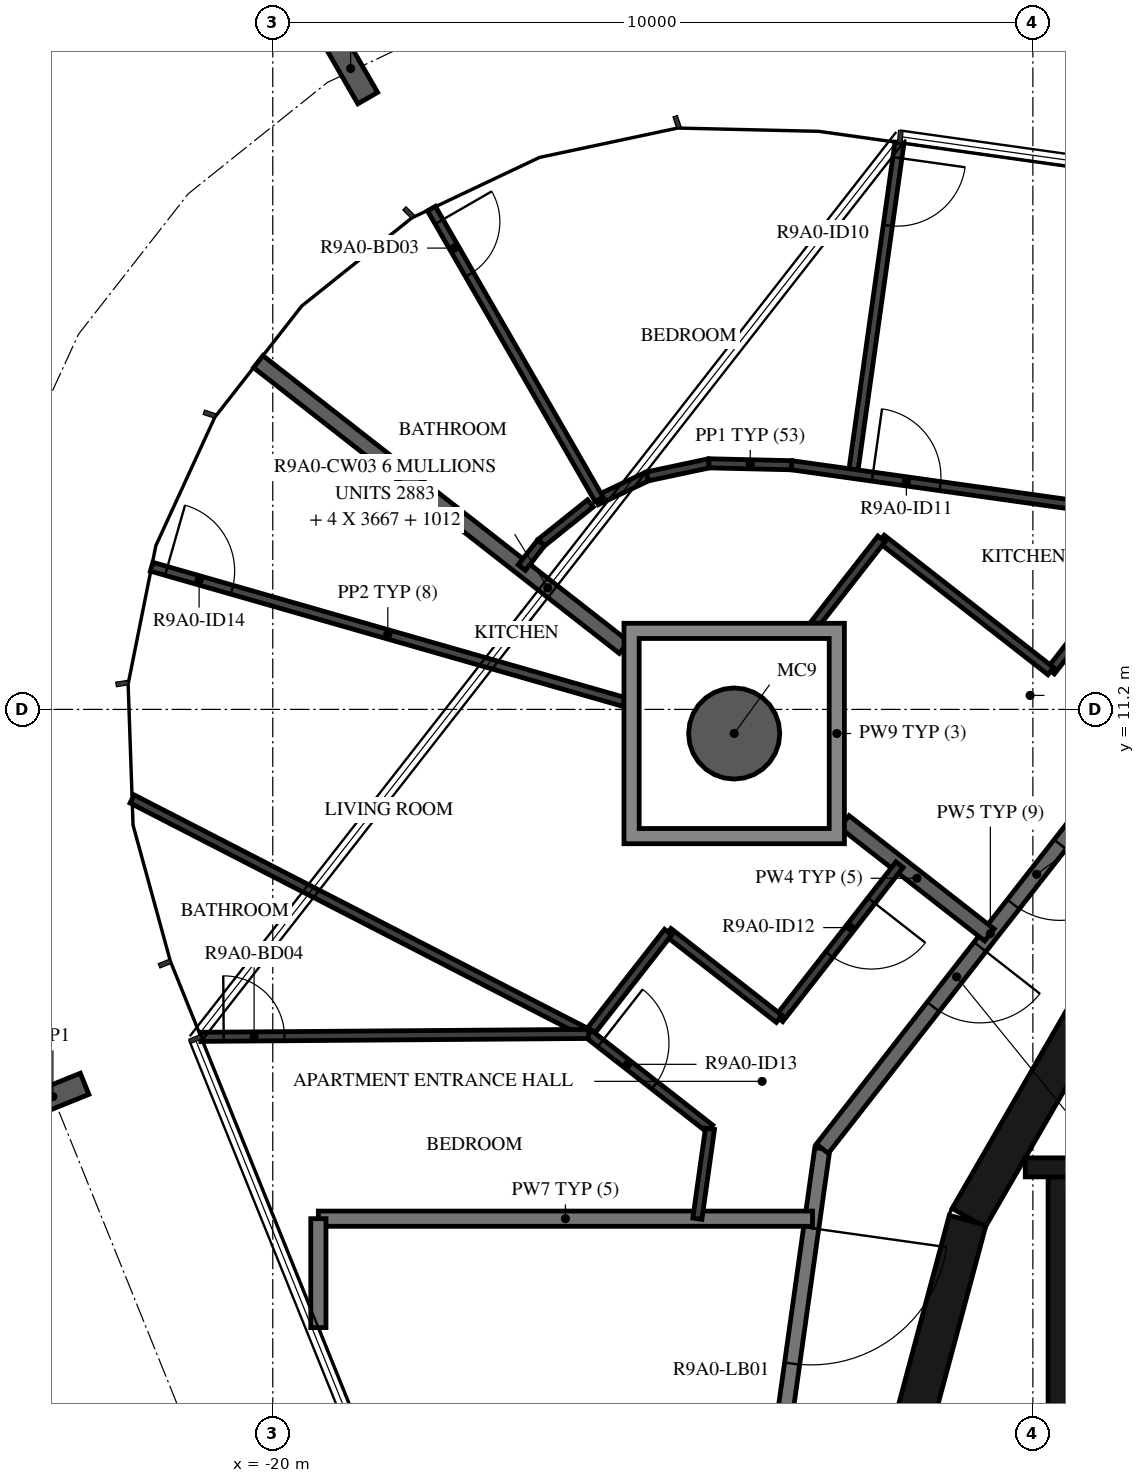
"""IFC4 building model, lengths in metres.
Left out: names, types, materials, properties, quantities, classifications, styles, units other than length and angle.
Written with IfcOpenShell. Run it as: python <this file> out.ifc"""

import sys

from ifc_helpers import new_model, si_unit, direction, frame, frame_2d, origin, origin_2d, place, context, subcontext, project, spatial, polyline, rectangle, hollow_circle, i_section, outline, extrude, element, fill, save


model = new_model("IFC4")
c1 = context("Model", 3, precision=1e-05, world=origin(), true_north=direction((0.0, 1.0)))
c2 = subcontext(c1, "Body", "Model", "MODEL_VIEW")
j1 = project(units=[si_unit("LENGTHUNIT", "METRE"), si_unit("PLANEANGLEUNIT", "RADIAN")], contexts=[c1])
p1 = place(None, origin())
s1 = spatial("IfcSite", under=j1, at=p1, CompositionType="ELEMENT")
p2 = place(p1, origin())
s2 = spatial("IfcBuilding", under=s1, at=p2, CompositionType="ELEMENT")
p3 = place(p2, frame((0.0, 0.0, 340.0)))
s3 = spatial("IfcBuildingStorey", under=s2, at=p3, CompositionType="ELEMENT", Elevation=340.0)
p4 = place(p3, frame((-13.929, 10.883, -0.38), z_axis=(0.0, 0.0, 1.0), x_axis=(1.0, 0.0, 0.0)))
e1 = element("IfcColumn", 1, at=p4, inside=s3, PredefinedType="COLUMN", context=c2, shape_type="SweptSolid", body=[
    extrude(hollow_circle(Radius=0.6, WallThickness=0.03, at=origin_2d()), origin(), (0.0, 0.0, 1.0), 3.5),
])
for number, where, z_axis, x_axis in (
    (2, (-18.976, 19.632, -0.38), (0.0, 0.0, 1.0), (0.866, 0.5, 0.0)),
    (3, (-22.893, 6.106, -0.38), (0.0, 0.0, 1.0), (-0.375, 0.927, 0.0)),
):
    element("IfcColumn", number, at=place(p3, frame(where, z_axis=z_axis, x_axis=x_axis)), inside=s3, PredefinedType="COLUMN", context=c2, shape_type="SweptSolid", body=[
        extrude(i_section(OverallWidth=0.3, OverallDepth=0.9, WebThickness=0.019, FlangeThickness=0.035, FilletRadius=0.03, at=origin_2d()), origin(), (0.0, 0.0, 1.0), 3.5),
    ])
for number, where, z_axis, x_axis in (
    (4, (-9.329, 7.137, 0.0), (0.0, 0.0, 1.0), (-0.5, -0.866, 0.0)),
    (5, (-10.858, 4.479, 0.0), (0.0, 0.0, 1.0), (-0.259, -0.966, 0.0)),
):
    element("IfcWall", number, at=place(p3, frame(where, z_axis=z_axis, x_axis=x_axis)), inside=s3, PredefinedType="SHEAR", context=c2, shape_type="SweptSolid", body=[
        extrude(rectangle(XDim=3.033, YDim=0.5, at=frame_2d((1.516, 0.0))), origin(), (0.0, 0.0, 1.0), 3.12),
    ])
p5 = place(p3, frame((-7.0, 5.175, 0.0), z_axis=(0.0, 0.0, 1.0), x_axis=(-1.0, 0.0, 0.0)))
e6 = element("IfcWall", 6, at=p5, inside=s3, PredefinedType="SHEAR", context=c2, shape_type="SweptSolid", body=[
    extrude(rectangle(XDim=3.1, YDim=0.25, at=frame_2d((1.55, 0.0))), origin(), (0.0, 0.0, 1.0), 3.12),
])
p6 = place(p3, origin())
e7 = element("IfcWall", 7, at=p6, inside=s3, PredefinedType="SHEAR", context=c2, shape_type="SweptSolid", body=[
    extrude(outline(polyline([(-9.8, 1.9), (-9.55, 1.9), (-9.55, 4.8), (-3.35, 4.8), (-3.35, 1.9), (-3.1, 1.9), (-3.1, 4.8), (3.1, 4.8), (3.1, 1.9), (3.35, 1.9), (3.35, 4.8), (5.25, 4.8), (5.25, 1.9), (5.5, 1.9), (5.5, 4.8), (7.4, 4.8), (7.4, 1.9), (7.65, 1.9), (7.65, 4.8), (9.55, 4.8), (9.55, 1.9), (9.8, 1.9), (9.8, 4.8), (9.8, 5.05), (-9.8, 5.05), (-9.8, 4.8), (-9.8, 1.9)])), origin(), (0.0, 0.0, 1.0), 3.12),
])
p7 = place(p3, frame((-12.77, 5.42, 0.0), z_axis=(0.0, 0.0, 1.0), x_axis=(-0.139155334385, -0.990270565508, 0.0)))
e8 = element("IfcWall", 8, at=p7, inside=s3, PredefinedType="STANDARD", context=c2, shape_type="SweptSolid", body=[
    extrude(rectangle(XDim=7.181, YDim=0.2, at=frame_2d((3.59, 0.0))), origin(), (0.0, 0.0, 1.0), 3.12),
])
p8 = place(p7, frame((1.055, 0.0, 0.0)))
e9 = element("IfcOpeningElement", 9, at=p8, cuts=e8, PredefinedType="OPENING", context=c2, shape_type="SweptSolid", body=[
    extrude(rectangle(XDim=1.8, YDim=2.1, at=frame_2d((0.9, 1.05))), frame((0.0, 0.11, 0.0), z_axis=(0.0, -1.0, 0.0), x_axis=(1.0, 0.0, 0.0)), (0.0, 0.0, 1.0), 0.22),
])
p9 = place(p3, frame((-8.349, 11.079, 0.0), z_axis=(0.0, 0.0, 1.0), x_axis=(-0.615669112324, -0.78800478687, 0.0)))
e10 = element("IfcWall", 10, at=p9, inside=s3, PredefinedType="STANDARD", context=c2, shape_type="SweptSolid", body=[
    extrude(rectangle(XDim=7.181, YDim=0.2, at=frame_2d((3.591, 0.0))), origin(), (0.0, 0.0, 1.0), 3.12),
])
p10 = place(p9, frame((2.1, 0.0, 0.0)))
e11 = element("IfcOpeningElement", 11, at=p10, cuts=e10, PredefinedType="OPENING", context=c2, shape_type="SweptSolid", body=[
    extrude(rectangle(XDim=1.0, YDim=2.1, at=frame_2d((0.5, 1.05))), frame((0.0, 0.11, 0.0), z_axis=(0.0, -1.0, 0.0), x_axis=(1.0, 0.0, 0.0)), (0.0, 0.0, 1.0), 0.22),
])
p11 = place(p9, frame((3.811, 0.0, 0.0)))
e12 = element("IfcOpeningElement", 12, at=p11, cuts=e10, PredefinedType="OPENING", context=c2, shape_type="SweptSolid", body=[
    extrude(rectangle(XDim=1.0, YDim=2.1, at=frame_2d((0.5, 1.05))), frame((0.0, 0.11, 0.0), z_axis=(0.0, -1.0, 0.0), x_axis=(1.0, 0.0, 0.0)), (0.0, 0.0, 1.0), 0.22),
])
p12 = place(p3, frame((-12.899, 4.5, 0.0), z_axis=(0.0, 0.0, 1.0), x_axis=(-1.0, 0.0, 0.0)))
e13 = element("IfcWall", 13, at=p12, inside=s3, PredefinedType="STANDARD", context=c2, shape_type="SweptSolid", body=[
    extrude(rectangle(XDim=6.5, YDim=0.2, at=frame_2d((3.25, 0.0))), origin(), (0.0, 0.0, 1.0), 3.12),
])
p13 = place(p3, frame((-19.4, 4.5, 0.0), z_axis=(0.0, 0.0, 1.0), x_axis=(0.0, -1.0, 0.0)))
e14 = element("IfcWall", 14, at=p13, inside=s3, PredefinedType="STANDARD", context=c2, shape_type="SweptSolid", body=[
    extrude(rectangle(XDim=1.433, YDim=0.2, at=frame_2d((0.716, 0.0))), origin(), (0.0, 0.0, 1.0), 3.12),
])
p14 = place(p3, frame((-12.479, 9.723, 0.0), z_axis=(0.0, 0.0, 1.0), x_axis=(0.788030490991, -0.615636211792, 0.0)))
e15 = element("IfcWall", 15, at=p14, inside=s3, PredefinedType="STANDARD", context=c2, shape_type="SweptSolid", body=[
    extrude(rectangle(XDim=2.42, YDim=0.2, at=frame_2d((1.21, 0.0))), origin(), (0.0, 0.0, 1.0), 3.12),
])
p15 = place(p3, frame((-20.191, 15.775, 0.0), z_axis=(0.0, 0.0, 1.0), x_axis=(0.788021948923, -0.615647145706, 0.0)))
e16 = element("IfcWall", 16, at=p15, inside=s3, PredefinedType="STANDARD", context=c2, shape_type="SweptSolid", body=[
    extrude(rectangle(XDim=6.106, YDim=0.2, at=frame_2d((3.053, 0.0))), origin(), (0.0, 0.0, 1.0), 3.12),
])
p16 = place(p3, frame((-9.283, 12.319, 0.0), z_axis=(0.0, 0.0, 1.0), x_axis=(-0.615735018346, -0.787953289975, 0.0)))
e17 = element("IfcWall", 17, at=p16, inside=s3, PredefinedType="PARTITIONING", context=c2, shape_type="SweptSolid", body=[
    extrude(rectangle(XDim=0.781, YDim=0.12, at=frame_2d((0.391, 0.0))), origin(), (0.0, 0.0, 1.0), 3.12),
])
p17 = place(p3, frame((-9.764, 11.704, 0.0), z_axis=(0.0, 0.0, 1.0), x_axis=(-0.787996873396, 0.615679240772, 0.0)))
e18 = element("IfcWall", 18, at=p17, inside=s3, PredefinedType="PARTITIONING", context=c2, shape_type="SweptSolid", body=[
    extrude(rectangle(XDim=2.826, YDim=0.12, at=frame_2d((1.413, 0.0))), origin(), (0.0, 0.0, 1.0), 3.12),
])
p18 = place(p3, frame((-11.992, 13.444, 0.0), z_axis=(0.0, 0.0, 1.0), x_axis=(-0.615593635541, -0.788063751153, 0.0)))
e19 = element("IfcWall", 19, at=p18, inside=s3, PredefinedType="PARTITIONING", context=c2, shape_type="SweptSolid", body=[
    extrude(rectangle(XDim=1.41, YDim=0.12, at=frame_2d((0.705, 0.0))), origin(), (0.0, 0.0, 1.0), 3.12),
])
p19 = place(p3, frame((-11.755, 18.656, 0.0), z_axis=(0.0, 0.0, 1.0), x_axis=(-0.13916046232, -0.990269844904, 0.0)))
e20 = element("IfcWall", 20, at=p19, inside=s3, PredefinedType="PARTITIONING", context=c2, shape_type="SweptSolid", body=[
    extrude(rectangle(XDim=4.4, YDim=0.12, at=frame_2d((2.2, 0.0))), origin(), (0.0, 0.0, 1.0), 2.73),
])
p20 = place(p19, frame((0.2, 0.0, 0.0)))
e21 = element("IfcOpeningElement", 21, at=p20, cuts=e20, PredefinedType="OPENING", context=c2, shape_type="SweptSolid", body=[
    extrude(rectangle(XDim=0.9, YDim=2.1, at=frame_2d((0.45, 1.05))), frame((0.0, 0.07, 0.0), z_axis=(0.0, -1.0, 0.0), x_axis=(1.0, 0.0, 0.0)), (0.0, 0.0, 1.0), 0.14),
])
p21 = place(p3, frame((-13.175, 14.412, 0.0), z_axis=(0.0, 0.0, 1.0), x_axis=(0.990264549393, -0.139198140128, 0.0)))
e22 = element("IfcWall", 22, at=p21, inside=s3, PredefinedType="PARTITIONING", context=c2, shape_type="SweptSolid", body=[
    extrude(rectangle(XDim=6.796, YDim=0.12, at=frame_2d((3.398, 0.0))), origin(), (0.0, 0.0, 1.0), 3.12),
])
p22 = place(p21, frame((1.075, 0.0, 0.0)))
e23 = element("IfcOpeningElement", 23, at=p22, cuts=e22, PredefinedType="OPENING", context=c2, shape_type="SweptSolid", body=[
    extrude(rectangle(XDim=0.9, YDim=2.1, at=frame_2d((0.45, 1.05))), frame((0.0, 0.07, 0.0), z_axis=(0.0, -1.0, 0.0), x_axis=(1.0, 0.0, 0.0)), (0.0, 0.0, 1.0), 0.14),
])
p23 = place(p3, frame((-15.743, 13.948, 0.0), z_axis=(0.0, 0.0, 1.0), x_axis=(0.903885078158, 0.427775368019, 0.0)))
e24 = element("IfcWall", 24, at=p23, inside=s3, PredefinedType="PARTITIONING", context=c2, shape_type="SweptSolid", body=[
    extrude(rectangle(XDim=0.742, YDim=0.12, at=frame_2d((0.371, 0.0))), origin(), (0.0, 0.0, 1.0), 3.12),
])
p24 = place(p3, frame((-15.072, 14.265, 0.0), z_axis=(0.0, 0.0, 1.0), x_axis=(0.978141630921, 0.207939774595, 0.0)))
e25 = element("IfcWall", 25, at=p24, inside=s3, PredefinedType="PARTITIONING", context=c2, shape_type="SweptSolid", body=[
    extrude(rectangle(XDim=0.829, YDim=0.12, at=frame_2d((0.415, 0.0))), origin(), (0.0, 0.0, 1.0), 3.12),
])
p25 = place(p3, frame((-14.261, 14.438, 0.0), z_axis=(0.0, 0.0, 1.0), x_axis=(0.999732237365, -0.023139869764, 0.0)))
e26 = element("IfcWall", 26, at=p25, inside=s3, PredefinedType="PARTITIONING", context=c2, shape_type="SweptSolid", body=[
    extrude(rectangle(XDim=1.087, YDim=0.12, at=frame_2d((0.543, 0.0))), origin(), (0.0, 0.0, 1.0), 3.12),
])
p26 = place(p3, frame((-17.912, 17.789, 0.0), z_axis=(0.0, 0.0, 1.0), x_axis=(0.499601164034, -0.866255549417, 0.0)))
e27 = element("IfcWall", 27, at=p26, inside=s3, PredefinedType="PARTITIONING", context=c2, shape_type="SweptSolid", body=[
    extrude(rectangle(XDim=4.415, YDim=0.12, at=frame_2d((2.207, 0.0))), origin(), (0.0, 0.0, 1.0), 2.73),
])
p27 = place(p26, frame((0.2, 0.0, 0.0)))
e28 = element("IfcOpeningElement", 28, at=p27, cuts=e27, PredefinedType="OPENING", context=c2, shape_type="SweptSolid", body=[
    extrude(rectangle(XDim=0.8, YDim=2.1, at=frame_2d((0.4, 1.05))), frame((0.0, 0.07, 0.0), z_axis=(0.0, -1.0, 0.0), x_axis=(1.0, 0.0, 0.0)), (0.0, 0.0, 1.0), 0.14),
])
p28 = place(p3, frame((-15.821, 13.91, 0.0), z_axis=(0.0, 0.0, 1.0), x_axis=(-0.780840072472, -0.624730967074, 0.0)))
e29 = element("IfcWall", 29, at=p28, inside=s3, PredefinedType="PARTITIONING", context=c2, shape_type="SweptSolid", body=[
    extrude(rectangle(XDim=0.829, YDim=0.12, at=frame_2d((0.415, 0.0))), origin(), (0.0, 0.0, 1.0), 3.12),
])
p29 = place(p3, frame((-16.469, 13.393, 0.0), z_axis=(0.0, 0.0, 1.0), x_axis=(-0.615815563257, -0.787890342656, 0.0)))
e30 = element("IfcWall", 30, at=p29, inside=s3, PredefinedType="PARTITIONING", context=c2, shape_type="SweptSolid", body=[
    extrude(rectangle(XDim=0.414, YDim=0.12, at=frame_2d((0.207, 0.0))), origin(), (0.0, 0.0, 1.0), 3.12),
])
p30 = place(p3, frame((-11.754, 9.157, 0.0), z_axis=(0.0, 0.0, 1.0), x_axis=(-0.615568539365, -0.788083354312, 0.0)))
e31 = element("IfcWall", 31, at=p30, inside=s3, PredefinedType="PARTITIONING", context=c2, shape_type="SweptSolid", body=[
    extrude(rectangle(XDim=2.573, YDim=0.12, at=frame_2d((1.286, 0.0))), origin(), (0.0, 0.0, 1.0), 3.12),
])
p31 = place(p30, frame((0.6, 0.0, 0.0)))
e32 = element("IfcOpeningElement", 32, at=p31, cuts=e31, PredefinedType="OPENING", context=c2, shape_type="SweptSolid", body=[
    extrude(rectangle(XDim=0.9, YDim=2.1, at=frame_2d((0.45, 1.05))), frame((0.0, 0.07, 0.0), z_axis=(0.0, -1.0, 0.0), x_axis=(1.0, 0.0, 0.0)), (0.0, 0.0, 1.0), 0.14),
])
p32 = place(p3, frame((-13.338, 7.129, 0.0), z_axis=(0.0, 0.0, 1.0), x_axis=(-0.787938483233, 0.615753965997, 0.0)))
e33 = element("IfcWall", 33, at=p32, inside=s3, PredefinedType="PARTITIONING", context=c2, shape_type="SweptSolid", body=[
    extrude(rectangle(XDim=1.853, YDim=0.12, at=frame_2d((0.927, 0.0))), origin(), (0.0, 0.0, 1.0), 3.12),
])
p33 = place(p3, frame((-14.798, 8.271, 0.0), z_axis=(0.0, 0.0, 1.0), x_axis=(-0.615669123866, -0.788004777852, 0.0)))
e34 = element("IfcWall", 34, at=p33, inside=s3, PredefinedType="PARTITIONING", context=c2, shape_type="SweptSolid", body=[
    extrude(rectangle(XDim=1.7, YDim=0.12, at=frame_2d((0.85, 0.0))), origin(), (0.0, 0.0, 1.0), 3.12),
])
p34 = place(p3, frame((-15.845, 6.931, 0.0), z_axis=(0.0, 0.0, 1.0), x_axis=(0.787962283792, -0.615723508827, 0.0)))
e35 = element("IfcWall", 35, at=p34, inside=s3, PredefinedType="PARTITIONING", context=c2, shape_type="SweptSolid", body=[
    extrude(rectangle(XDim=2.027, YDim=0.12, at=frame_2d((1.013, 0.0))), origin(), (0.0, 0.0, 1.0), 3.12),
])
p35 = place(p34, frame((0.2, 0.0, 0.0)))
e36 = element("IfcOpeningElement", 36, at=p35, cuts=e35, PredefinedType="OPENING", context=c2, shape_type="SweptSolid", body=[
    extrude(rectangle(XDim=0.9, YDim=2.1, at=frame_2d((0.45, 1.05))), frame((0.0, 0.07, 0.0), z_axis=(0.0, -1.0, 0.0), x_axis=(1.0, 0.0, 0.0)), (0.0, 0.0, 1.0), 0.14),
])
p36 = place(p3, frame((-14.248, 5.683, 0.0), z_axis=(0.0, 0.0, 1.0), x_axis=(-0.139189066398, -0.990265824814, 0.0)))
e37 = element("IfcWall", 37, at=p36, inside=s3, PredefinedType="PARTITIONING", context=c2, shape_type="SweptSolid", body=[
    extrude(rectangle(XDim=1.195, YDim=0.12, at=frame_2d((0.597, 0.0))), origin(), (0.0, 0.0, 1.0), 3.12),
])
p37 = place(p3, frame((-21.594, 13.077, 0.0), z_axis=(0.0, 0.0, 1.0), x_axis=(0.961389857774, -0.275190009576, 0.0)))
e38 = element("IfcWall", 38, at=p37, inside=s3, PredefinedType="PARTITIONING", context=c2, shape_type="SweptSolid", body=[
    extrude(rectangle(XDim=6.464, YDim=0.12, at=frame_2d((3.232, 0.0))), origin(), (0.0, 0.0, 1.0), 2.73),
])
p38 = place(p37, frame((0.2, 0.0, 0.0)))
e39 = element("IfcOpeningElement", 39, at=p38, cuts=e38, PredefinedType="OPENING", context=c2, shape_type="SweptSolid", body=[
    extrude(rectangle(XDim=0.9, YDim=2.1, at=frame_2d((0.45, 1.05))), frame((0.0, 0.07, 0.0), z_axis=(0.0, -1.0, 0.0), x_axis=(1.0, 0.0, 0.0)), (0.0, 0.0, 1.0), 0.14),
])
p39 = place(p3, frame((-21.85, 10.021, 0.0), z_axis=(0.0, 0.0, 1.0), x_axis=(0.889153763622, -0.457608549567, 0.0)))
e40 = element("IfcWall", 40, at=p39, inside=s3, PredefinedType="PARTITIONING", context=c2, shape_type="SweptSolid", body=[
    extrude(rectangle(XDim=6.754, YDim=0.12, at=frame_2d((3.377, 0.0))), origin(), (0.0, 0.0, 1.0), 3.12),
])
p40 = place(p3, frame((-20.946, 6.892, 0.0), z_axis=(0.0, 0.0, 1.0), x_axis=(0.999971403985, 0.007562487164, 0.0)))
e41 = element("IfcWall", 41, at=p40, inside=s3, PredefinedType="PARTITIONING", context=c2, shape_type="SweptSolid", body=[
    extrude(rectangle(XDim=5.101, YDim=0.12, at=frame_2d((2.55, 0.0))), origin(), (0.0, 0.0, 1.0), 3.12),
])
p41 = place(p40, frame((0.3, 0.0, 0.0)))
e42 = element("IfcOpeningElement", 42, at=p41, cuts=e41, PredefinedType="OPENING", context=c2, shape_type="SweptSolid", body=[
    extrude(rectangle(XDim=0.8, YDim=2.1, at=frame_2d((0.4, 1.05))), frame((0.0, 0.07, 0.0), z_axis=(0.0, -1.0, 0.0), x_axis=(1.0, 0.0, 0.0)), (0.0, 0.0, 1.0), 0.14),
])
p42 = place(p3, origin())
e43 = element("IfcWall", 43, at=p42, inside=s3, PredefinedType="STANDARD", context=c2, shape_type="SweptSolid", body=[
    extrude(outline(polyline([(-12.479, 12.333), (-12.479, 9.433), (-15.379, 9.433), (-15.379, 12.333), (-12.479, 12.333)]), holes=[polyline([(-15.179, 9.633), (-12.679, 9.633), (-12.679, 12.133), (-15.179, 12.133), (-15.179, 9.633)])]), origin(), (0.0, 0.0, 1.0), 3.12),
])
p43 = place(p10, origin())
e44 = element("IfcDoor", 44, at=p43, inside=s3, OperationType="SINGLE_SWING_RIGHT", PredefinedType="DOOR", context=c2, shape_type="SweptSolid", body=[
    extrude(rectangle(XDim=1.0, YDim=2.1, at=frame_2d((0.5, 1.05))), frame((0.0, 0.025, 0.0), z_axis=(0.0, -1.0, 0.0), x_axis=(1.0, 0.0, 0.0)), (0.0, 0.0, 1.0), 0.05),
])
fill(e11, e44)
p44 = place(p20, origin())
e45 = element("IfcDoor", 45, at=p44, inside=s3, OperationType="SINGLE_SWING_RIGHT", PredefinedType="DOOR", context=c2, shape_type="SweptSolid", body=[
    extrude(rectangle(XDim=0.9, YDim=2.1, at=frame_2d((0.45, 1.05))), frame((0.0, 0.025, 0.0), z_axis=(0.0, -1.0, 0.0), x_axis=(1.0, 0.0, 0.0)), (0.0, 0.0, 1.0), 0.05),
])
fill(e21, e45)
p45 = place(p27, origin())
e46 = element("IfcDoor", 46, at=p45, inside=s3, OperationType="SINGLE_SWING_RIGHT", PredefinedType="DOOR", context=c2, shape_type="SweptSolid", body=[
    extrude(rectangle(XDim=0.8, YDim=2.1, at=frame_2d((0.4, 1.05))), frame((0.0, 0.025, 0.0), z_axis=(0.0, -1.0, 0.0), x_axis=(1.0, 0.0, 0.0)), (0.0, 0.0, 1.0), 0.05),
])
fill(e28, e46)
p46 = place(p22, origin())
e47 = element("IfcDoor", 47, at=p46, inside=s3, OperationType="SINGLE_SWING_LEFT", PredefinedType="DOOR", context=c2, shape_type="SweptSolid", body=[
    extrude(rectangle(XDim=0.9, YDim=2.1, at=frame_2d((0.45, 1.05))), frame((0.0, 0.025, 0.0), z_axis=(0.0, -1.0, 0.0), x_axis=(1.0, 0.0, 0.0)), (0.0, 0.0, 1.0), 0.05),
])
fill(e23, e47)
p47 = place(p11, origin())
e48 = element("IfcDoor", 48, at=p47, inside=s3, OperationType="SINGLE_SWING_LEFT", PredefinedType="DOOR", context=c2, shape_type="SweptSolid", body=[
    extrude(rectangle(XDim=1.0, YDim=2.1, at=frame_2d((0.5, 1.05))), frame((0.0, 0.025, 0.0), z_axis=(0.0, -1.0, 0.0), x_axis=(1.0, 0.0, 0.0)), (0.0, 0.0, 1.0), 0.05),
])
fill(e12, e48)
p48 = place(p31, origin())
e49 = element("IfcDoor", 49, at=p48, inside=s3, OperationType="SINGLE_SWING_LEFT", PredefinedType="DOOR", context=c2, shape_type="SweptSolid", body=[
    extrude(rectangle(XDim=0.9, YDim=2.1, at=frame_2d((0.45, 1.05))), frame((0.0, 0.025, 0.0), z_axis=(0.0, -1.0, 0.0), x_axis=(1.0, 0.0, 0.0)), (0.0, 0.0, 1.0), 0.05),
])
fill(e32, e49)
p49 = place(p35, origin())
e50 = element("IfcDoor", 50, at=p49, inside=s3, OperationType="SINGLE_SWING_LEFT", PredefinedType="DOOR", context=c2, shape_type="SweptSolid", body=[
    extrude(rectangle(XDim=0.9, YDim=2.1, at=frame_2d((0.45, 1.05))), frame((0.0, 0.025, 0.0), z_axis=(0.0, -1.0, 0.0), x_axis=(1.0, 0.0, 0.0)), (0.0, 0.0, 1.0), 0.05),
])
fill(e36, e50)
p50 = place(p38, origin())
e51 = element("IfcDoor", 51, at=p50, inside=s3, OperationType="SINGLE_SWING_LEFT", PredefinedType="DOOR", context=c2, shape_type="SweptSolid", body=[
    extrude(rectangle(XDim=0.9, YDim=2.1, at=frame_2d((0.45, 1.05))), frame((0.0, 0.025, 0.0), z_axis=(0.0, -1.0, 0.0), x_axis=(1.0, 0.0, 0.0)), (0.0, 0.0, 1.0), 0.05),
])
fill(e39, e51)
p51 = place(p41, origin())
e52 = element("IfcDoor", 52, at=p51, inside=s3, OperationType="SINGLE_SWING_LEFT", PredefinedType="DOOR", context=c2, shape_type="SweptSolid", body=[
    extrude(rectangle(XDim=0.8, YDim=2.1, at=frame_2d((0.4, 1.05))), frame((0.0, 0.025, 0.0), z_axis=(0.0, -1.0, 0.0), x_axis=(1.0, 0.0, 0.0)), (0.0, 0.0, 1.0), 0.05),
])
fill(e42, e52)
p52 = place(p8, origin())
e53 = element("IfcDoor", 53, at=p52, inside=s3, OperationType="DOUBLE_DOOR_SINGLE_SWING", PredefinedType="DOOR", context=c2, shape_type="SweptSolid", body=[
    extrude(rectangle(XDim=1.8, YDim=2.1, at=frame_2d((0.9, 1.05))), frame((0.0, 0.025, 0.0), z_axis=(0.0, -1.0, 0.0), x_axis=(1.0, 0.0, 0.0)), (0.0, 0.0, 1.0), 0.05),
])
fill(e9, e53)
save(model, sys.argv[1])
